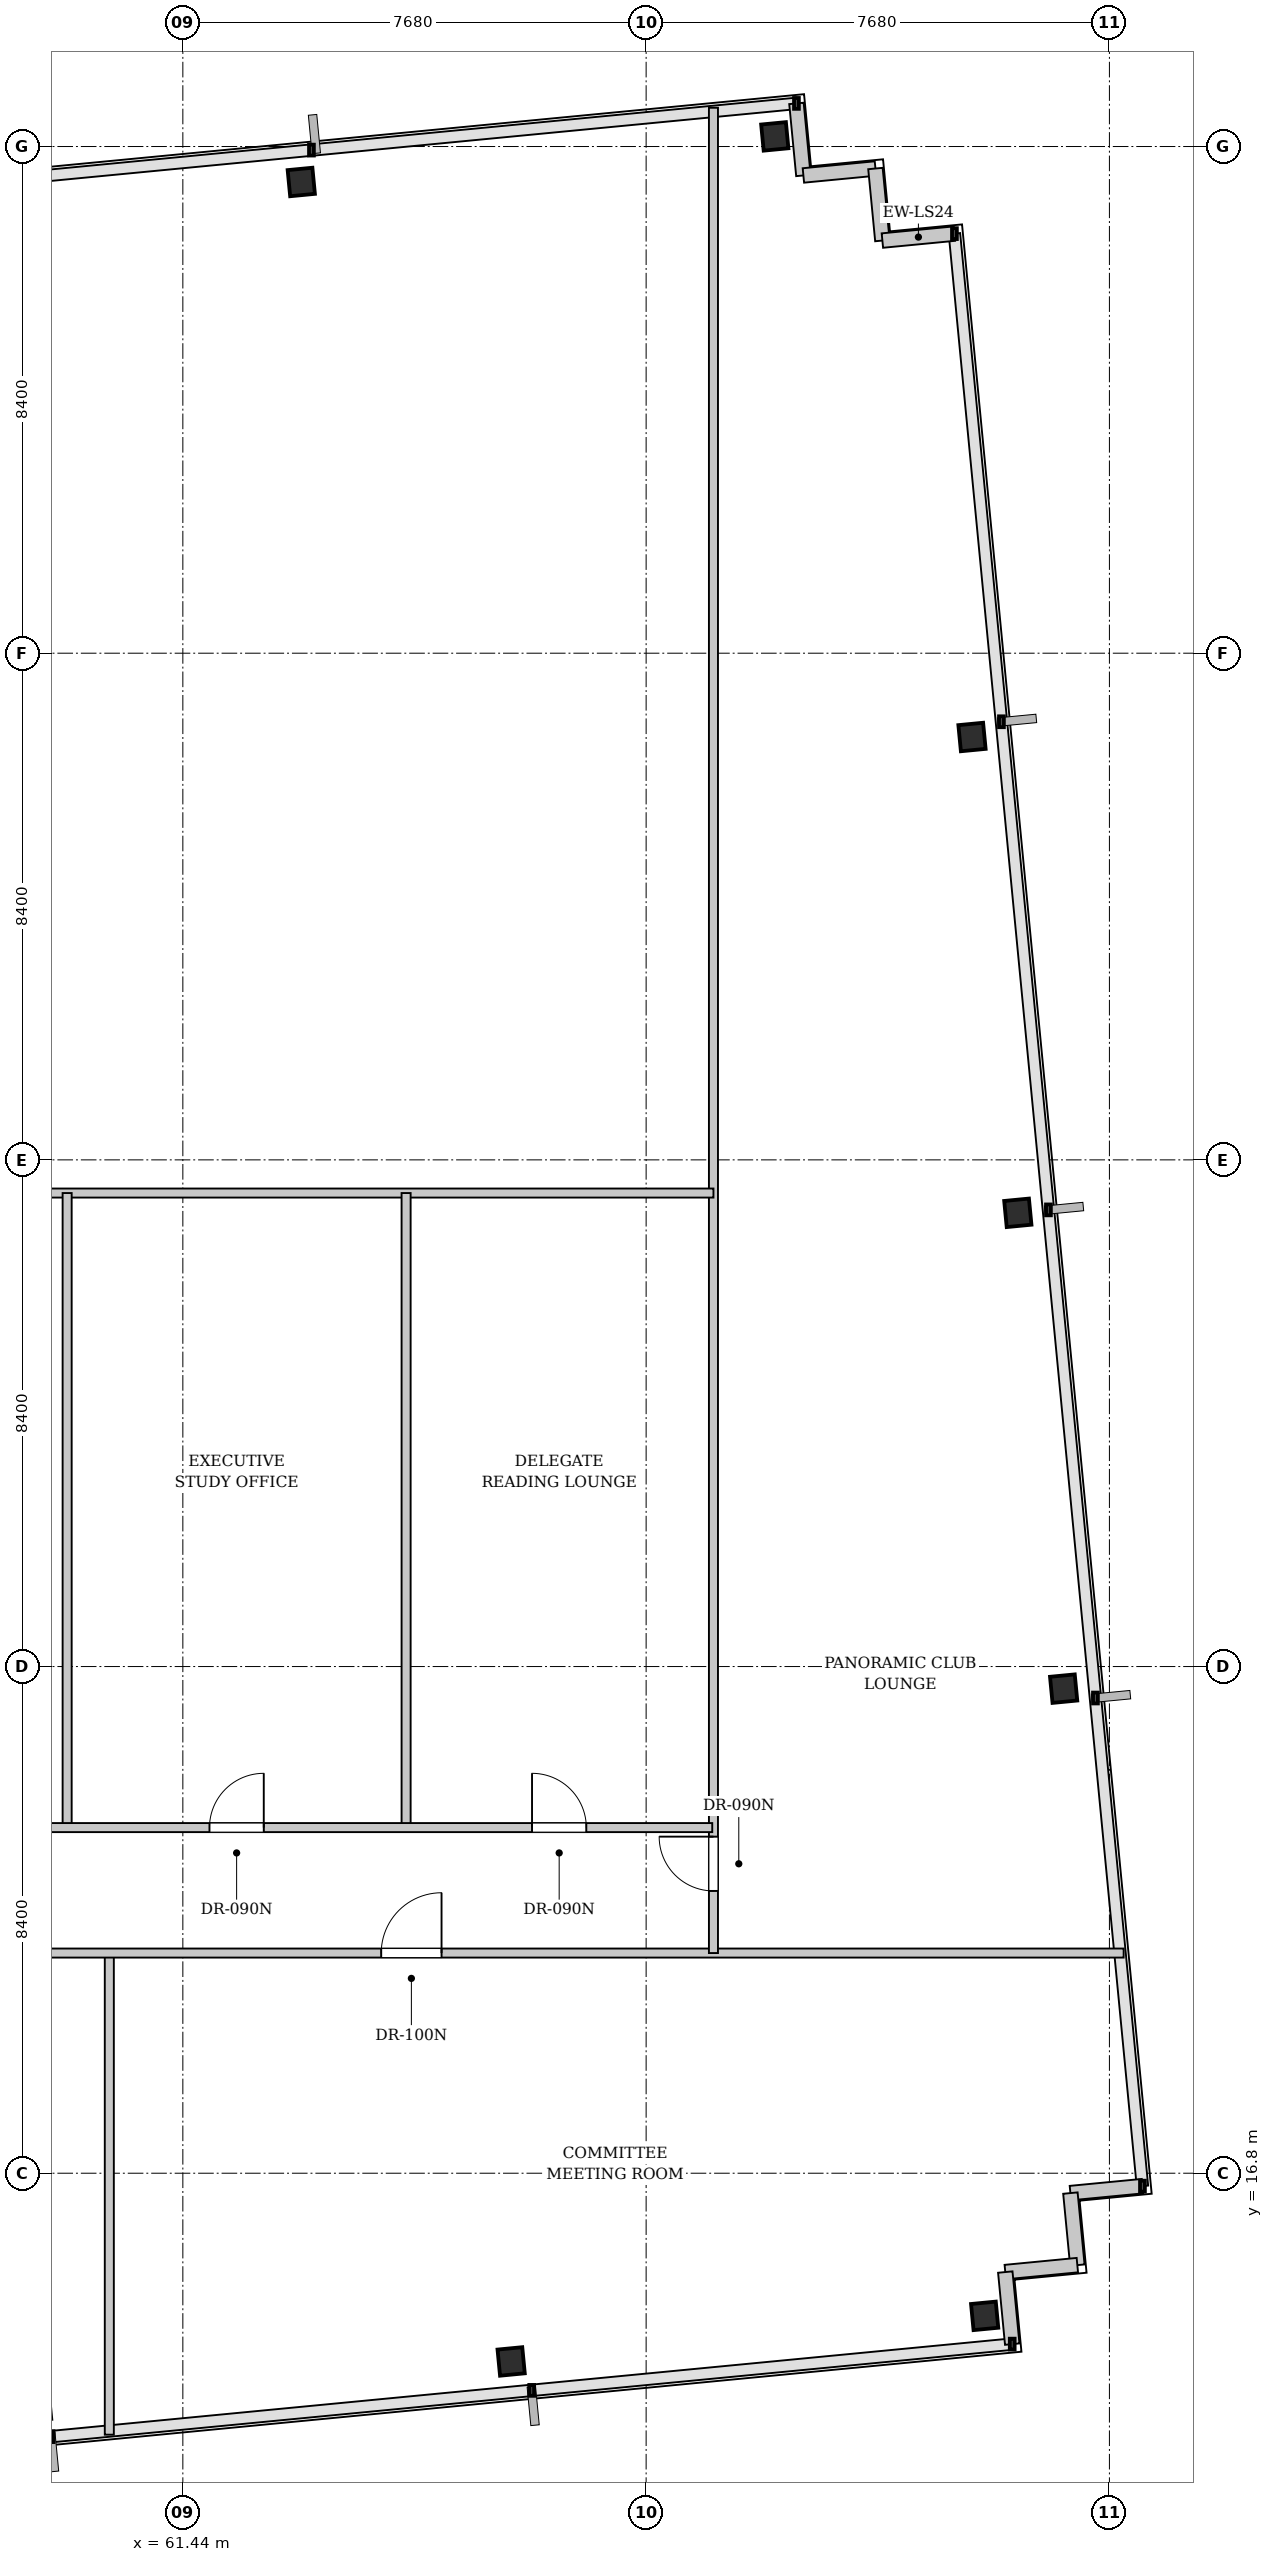
"""IFC4 building model, lengths in metres.
Left out: names, types, materials, properties, quantities, classifications, styles, units other than length and angle.
Written with IfcOpenShell. Run it as: python <this file> out.ifc"""

import sys

from ifc_helpers import new_model, si_unit, direction, frame, frame_2d, origin, origin_2d, place, context, subcontext, project, spatial, rectangle, i_section, extrude, element, fill, save


model = new_model("IFC4")
c1 = context("Model", 3, precision=1e-05, world=origin(), true_north=direction((0.0, 1.0)))
c2 = subcontext(c1, "Body", "Model", "MODEL_VIEW")
j1 = project(units=[si_unit("LENGTHUNIT", "METRE"), si_unit("PLANEANGLEUNIT", "RADIAN")], contexts=[c1])
p1 = place(None, origin())
s1 = spatial("IfcSite", under=j1, at=p1, CompositionType="ELEMENT")
p2 = place(p1, origin())
s2 = spatial("IfcBuilding", under=s1, at=p2, CompositionType="ELEMENT")
p3 = place(p2, frame((0.0, 0.0, 123.7)))
s3 = spatial("IfcBuildingStorey", under=s2, at=p3, CompositionType="ELEMENT", Elevation=123.7)
for number, where, z_axis, x_axis in (
    (1, (66.883, 13.679, 0.0), (0.0, 0.0, 1.0), (0.995, 0.096, 0.0)),
    (2, (74.732, 14.435, 0.0), (0.0, 0.0, 1.0), (0.995, 0.096, 0.0)),
    (3, (63.403, 49.812, 0.0), (0.0, 0.0, 1.0), (0.995, 0.096, 0.0)),
    (4, (71.253, 50.568, 0.0), (0.0, 0.0, 1.0), (0.995, 0.096, 0.0)),
    (5, (76.041, 24.833, 0.0), (0.0, 0.0, 1.0), (0.995, 0.096, 0.0)),
    (6, (75.282, 32.722, 0.0), (0.0, 0.0, 1.0), (0.995, 0.096, 0.0)),
    (7, (74.522, 40.611, 0.0), (0.0, 0.0, 1.0), (0.995, 0.096, 0.0)),
):
    element("IfcColumn", number, at=place(p3, frame(where, z_axis=z_axis, x_axis=x_axis)), inside=s3, PredefinedType="COLUMN", context=c2, shape_type="SweptSolid", body=[
        extrude(i_section(OverallWidth=0.412, OverallDepth=0.435, WebThickness=0.036, FlangeThickness=0.058, FilletRadius=0.015, at=origin_2d()), origin(), (0.0, 0.0, 1.0), 3.4),
    ])
for number, where, z_axis, x_axis in (
    (8, (71.612, 51.115, 0.0), (0.0, 0.0, 1.0), (0.096, -0.995, 0.0)),
    (9, (71.727, 49.92, 0.0), (0.0, 0.0, 1.0), (0.995, 0.096, 0.0)),
    (10, (72.921, 50.035, 0.0), (0.0, 0.0, 1.0), (0.096, -0.995, 0.0)),
    (11, (73.036, 48.841, 0.0), (0.0, 0.0, 1.0), (0.995, 0.096, 0.0)),
):
    element("IfcWall", number, at=place(p3, frame(where, z_axis=z_axis, x_axis=x_axis)), inside=s3, PredefinedType="SOLIDWALL", context=c2, shape_type="SweptSolid", body=[
        extrude(rectangle(XDim=1.2, YDim=0.24, at=frame_2d((0.6, 0.0))), origin(), (0.0, 0.0, 1.0), 3.18),
    ])
p4 = place(p3, frame((77.348, 16.586, 0.0), z_axis=(0.0, 0.0, 1.0), x_axis=(-0.995397091755, -0.095836473879, 0.0)))
e12 = element("IfcWall", 12, at=p4, inside=s3, PredefinedType="SOLIDWALL", context=c2, shape_type="SweptSolid", body=[
    extrude(rectangle(XDim=1.2, YDim=0.24, at=frame_2d((0.6, 0.0))), origin(), (0.0, 0.0, 1.0), 3.18),
])
for number, where, z_axis, x_axis in (
    (13, (76.153, 16.471, 0.0), (0.0, 0.0, 1.0), (0.096, -0.995, 0.0)),
    (14, (76.268, 15.276, 0.0), (0.0, 0.0, 1.0), (-0.995, -0.096, 0.0)),
):
    element("IfcWall", number, at=place(p3, frame(where, z_axis=z_axis, x_axis=x_axis)), inside=s3, PredefinedType="SOLIDWALL", context=c2, shape_type="SweptSolid", body=[
        extrude(rectangle(XDim=1.2, YDim=0.24, at=frame_2d((0.6, 0.0))), origin(), (0.0, 0.0, 1.0), 3.18),
    ])
p5 = place(p3, frame((75.074, 15.161, 0.0), z_axis=(0.0, 0.0, 1.0), x_axis=(0.095836473879, -0.995397091755, 0.0)))
e15 = element("IfcWall", 15, at=p5, inside=s3, PredefinedType="SOLIDWALL", context=c2, shape_type="SweptSolid", body=[
    extrude(rectangle(XDim=1.2, YDim=0.24, at=frame_2d((0.6, 0.0))), origin(), (0.0, 0.0, 1.0), 3.18),
])
p6 = place(p3, frame((60.221, 12.465, 0.0), z_axis=(0.0, 0.0, 1.0), x_axis=(0.0, 1.0, 0.0)))
e16 = element("IfcWall", 16, at=p6, inside=s3, PredefinedType="PARTITIONING", context=c2, shape_type="SweptSolid", body=[
    extrude(rectangle(XDim=8.005, YDim=0.15, at=frame_2d((4.002, 0.0))), origin(), (0.0, 0.0, 1.0), 3.18),
])
p7 = place(p3, frame((15.814, 20.45, 0.0), z_axis=(0.0, 0.0, 1.0), x_axis=(1.0, 0.0, 0.0)))
e17 = element("IfcWall", 17, at=p7, inside=s3, PredefinedType="PARTITIONING", context=c2, shape_type="SweptSolid", body=[
    extrude(rectangle(XDim=61.222, YDim=0.15, at=frame_2d((30.611, 0.0))), origin(), (0.0, 0.0, 1.0), 3.18),
])
p8 = place(p7, frame((9.243, 0.0, 0.0)))
e18 = element("IfcOpeningElement", 18, at=p8, cuts=e17, PredefinedType="OPENING", context=c2, shape_type="SweptSolid", body=[
    extrude(rectangle(XDim=1.0, YDim=2.15, at=frame_2d((0.5, 1.075))), frame((0.0, 0.085, 0.0), z_axis=(0.0, -1.0, 0.0), x_axis=(1.0, 0.0, 0.0)), (0.0, 0.0, 1.0), 0.17),
])
p9 = place(p7, frame((19.674, 0.0, 0.0)))
e19 = element("IfcOpeningElement", 19, at=p9, cuts=e17, PredefinedType="OPENING", context=c2, shape_type="SweptSolid", body=[
    extrude(rectangle(XDim=1.0, YDim=2.15, at=frame_2d((0.5, 1.075))), frame((0.0, 0.085, 0.0), z_axis=(0.0, -1.0, 0.0), x_axis=(1.0, 0.0, 0.0)), (0.0, 0.0, 1.0), 0.17),
])
p10 = place(p7, frame((30.647, 0.0, 0.0)))
e20 = element("IfcOpeningElement", 20, at=p10, cuts=e17, PredefinedType="OPENING", context=c2, shape_type="SweptSolid", body=[
    extrude(rectangle(XDim=1.0, YDim=2.15, at=frame_2d((0.5, 1.075))), frame((0.0, 0.085, 0.0), z_axis=(0.0, -1.0, 0.0), x_axis=(1.0, 0.0, 0.0)), (0.0, 0.0, 1.0), 0.17),
])
p11 = place(p7, frame((40.021, 0.0, 0.0)))
e21 = element("IfcOpeningElement", 21, at=p11, cuts=e17, PredefinedType="OPENING", context=c2, shape_type="SweptSolid", body=[
    extrude(rectangle(XDim=1.0, YDim=2.15, at=frame_2d((0.5, 1.075))), frame((0.0, 0.085, 0.0), z_axis=(0.0, -1.0, 0.0), x_axis=(1.0, 0.0, 0.0)), (0.0, 0.0, 1.0), 0.17),
])
p12 = place(p7, frame((48.914, 0.0, 0.0)))
e22 = element("IfcOpeningElement", 22, at=p12, cuts=e17, PredefinedType="OPENING", context=c2, shape_type="SweptSolid", body=[
    extrude(rectangle(XDim=1.0, YDim=2.15, at=frame_2d((0.5, 1.075))), frame((0.0, 0.085, 0.0), z_axis=(0.0, -1.0, 0.0), x_axis=(1.0, 0.0, 0.0)), (0.0, 0.0, 1.0), 0.17),
])
p13 = place(p3, frame((70.236, 20.45, 0.0), z_axis=(0.0, 0.0, 1.0), x_axis=(0.0, 1.0, 0.0)))
e23 = element("IfcWall", 23, at=p13, inside=s3, PredefinedType="PARTITIONING", context=c2, shape_type="SweptSolid", body=[
    extrude(rectangle(XDim=30.593, YDim=0.15, at=frame_2d((15.296, 0.0))), origin(), (0.0, 0.0, 1.0), 3.18),
])
p14 = place(p13, frame((1.03, 0.0, 0.0)))
e24 = element("IfcOpeningElement", 24, at=p14, cuts=e23, PredefinedType="OPENING", context=c2, shape_type="SweptSolid", body=[
    extrude(rectangle(XDim=0.9, YDim=2.15, at=frame_2d((0.45, 1.075))), frame((0.0, 0.085, 0.0), z_axis=(0.0, -1.0, 0.0), x_axis=(1.0, 0.0, 0.0)), (0.0, 0.0, 1.0), 0.17),
])
p15 = place(p3, frame((52.08, 33.05, 0.0), z_axis=(0.0, 0.0, 1.0), x_axis=(1.0, 0.0, 0.0)))
e25 = element("IfcWall", 25, at=p15, inside=s3, PredefinedType="PARTITIONING", context=c2, shape_type="SweptSolid", body=[
    extrude(rectangle(XDim=18.156, YDim=0.15, at=frame_2d((9.078, 0.0))), origin(), (0.0, 0.0, 1.0), 2.525),
])
for number, where, z_axis, x_axis in (
    (26, (59.522, 22.53, 0.0), (0.0, 0.0, 1.0), (0.0, 1.0, 0.0)),
    (27, (65.141, 22.53, 0.0), (0.0, 0.0, 1.0), (0.0, 1.0, 0.0)),
):
    element("IfcWall", number, at=place(p3, frame(where, z_axis=z_axis, x_axis=x_axis)), inside=s3, PredefinedType="PARTITIONING", context=c2, shape_type="SweptSolid", body=[
        extrude(rectangle(XDim=10.52, YDim=0.15, at=frame_2d((5.26, 0.0))), origin(), (0.0, 0.0, 1.0), 3.18),
    ])
p16 = place(p3, frame((52.09, 22.53, 0.0), z_axis=(0.0, 0.0, 1.0), x_axis=(1.0, 0.0, 0.0)))
e28 = element("IfcWall", 28, at=p16, inside=s3, PredefinedType="PARTITIONING", context=c2, shape_type="SweptSolid", body=[
    extrude(rectangle(XDim=18.126, YDim=0.15, at=frame_2d((9.063, 0.0))), origin(), (0.0, 0.0, 1.0), 3.18),
])
p17 = place(p16, frame((1.091, 0.0, 0.0)))
e29 = element("IfcOpeningElement", 29, at=p17, cuts=e28, PredefinedType="OPENING", context=c2, shape_type="SweptSolid", body=[
    extrude(rectangle(XDim=0.9, YDim=2.15, at=frame_2d((0.45, 1.075))), frame((0.0, 0.085, 0.0), z_axis=(0.0, -1.0, 0.0), x_axis=(1.0, 0.0, 0.0)), (0.0, 0.0, 1.0), 0.17),
])
p18 = place(p16, frame((4.806, 0.0, 0.0)))
e30 = element("IfcOpeningElement", 30, at=p18, cuts=e28, PredefinedType="OPENING", context=c2, shape_type="SweptSolid", body=[
    extrude(rectangle(XDim=0.9, YDim=2.15, at=frame_2d((0.45, 1.075))), frame((0.0, 0.085, 0.0), z_axis=(0.0, -1.0, 0.0), x_axis=(1.0, 0.0, 0.0)), (0.0, 0.0, 1.0), 0.17),
])
p19 = place(p16, frame((9.792, 0.0, 0.0)))
e31 = element("IfcOpeningElement", 31, at=p19, cuts=e28, PredefinedType="OPENING", context=c2, shape_type="SweptSolid", body=[
    extrude(rectangle(XDim=0.9, YDim=2.15, at=frame_2d((0.45, 1.075))), frame((0.0, 0.085, 0.0), z_axis=(0.0, -1.0, 0.0), x_axis=(1.0, 0.0, 0.0)), (0.0, 0.0, 1.0), 0.17),
])
p20 = place(p16, frame((15.138, 0.0, 0.0)))
e32 = element("IfcOpeningElement", 32, at=p20, cuts=e28, PredefinedType="OPENING", context=c2, shape_type="SweptSolid", body=[
    extrude(rectangle(XDim=0.9, YDim=2.15, at=frame_2d((0.45, 1.075))), frame((0.0, 0.085, 0.0), z_axis=(0.0, -1.0, 0.0), x_axis=(1.0, 0.0, 0.0)), (0.0, 0.0, 1.0), 0.17),
])
p21 = place(p12, origin())
e33 = element("IfcDoor", 33, at=p21, inside=s3, OperationType="SINGLE_SWING_RIGHT", PredefinedType="DOOR", context=c2, shape_type="SweptSolid", body=[
    extrude(rectangle(XDim=1.0, YDim=2.15, at=frame_2d((0.5, 1.075))), frame((0.0, 0.025, 0.0), z_axis=(0.0, -1.0, 0.0), x_axis=(1.0, 0.0, 0.0)), (0.0, 0.0, 1.0), 0.05),
])
fill(e22, e33)
p22 = place(p14, origin())
e34 = element("IfcDoor", 34, at=p22, inside=s3, OperationType="SINGLE_SWING_RIGHT", PredefinedType="DOOR", context=c2, shape_type="SweptSolid", body=[
    extrude(rectangle(XDim=0.9, YDim=2.15, at=frame_2d((0.45, 1.075))), frame((0.0, 0.025, 0.0), z_axis=(0.0, -1.0, 0.0), x_axis=(1.0, 0.0, 0.0)), (0.0, 0.0, 1.0), 0.05),
])
fill(e24, e34)
p23 = place(p19, origin())
e35 = element("IfcDoor", 35, at=p23, inside=s3, OperationType="SINGLE_SWING_RIGHT", PredefinedType="DOOR", context=c2, shape_type="SweptSolid", body=[
    extrude(rectangle(XDim=0.9, YDim=2.15, at=frame_2d((0.45, 1.075))), frame((0.0, 0.025, 0.0), z_axis=(0.0, -1.0, 0.0), x_axis=(1.0, 0.0, 0.0)), (0.0, 0.0, 1.0), 0.05),
])
fill(e31, e35)
p24 = place(p20, origin())
e36 = element("IfcDoor", 36, at=p24, inside=s3, OperationType="SINGLE_SWING_LEFT", PredefinedType="DOOR", context=c2, shape_type="SweptSolid", body=[
    extrude(rectangle(XDim=0.9, YDim=2.15, at=frame_2d((0.45, 1.075))), frame((0.0, 0.025, 0.0), z_axis=(0.0, -1.0, 0.0), x_axis=(1.0, 0.0, 0.0)), (0.0, 0.0, 1.0), 0.05),
])
fill(e32, e36)
save(model, sys.argv[1])
